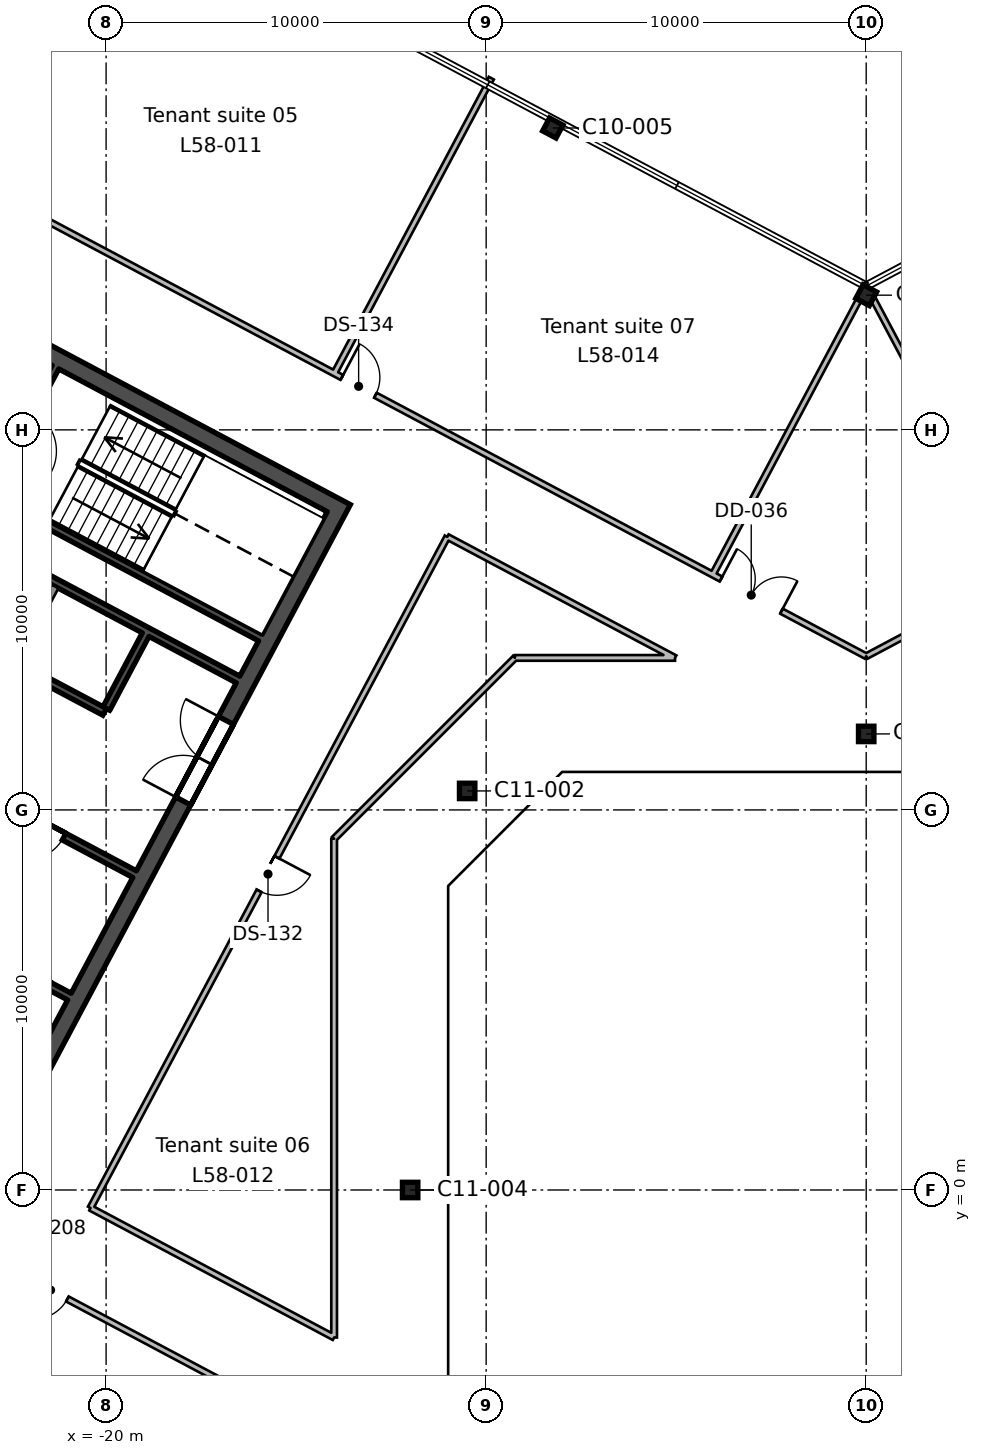
"""IFC4 building model, lengths in metres.
Left out: names, types, materials, properties, quantities, classifications, styles, units other than length and angle.
Written with IfcOpenShell. Run it as: python <this file> out.ifc"""

import sys

from ifc_helpers import new_model, si_unit, direction, frame, frame_2d, origin, origin_2d, place, context, subcontext, project, spatial, rectangle, hollow_rectangle, i_section, extrude, element, fill, save


model = new_model("IFC4")
c1 = context("Model", 3, precision=1e-05, world=origin(), true_north=direction((0.0, 1.0)))
c2 = subcontext(c1, "Body", "Model", "MODEL_VIEW")
j1 = project(units=[si_unit("LENGTHUNIT", "METRE"), si_unit("PLANEANGLEUNIT", "RADIAN")], contexts=[c1])
p1 = place(None, origin())
s1 = spatial("IfcSite", under=j1, at=p1, CompositionType="ELEMENT")
p2 = place(p1, origin())
s2 = spatial("IfcBuilding", under=s1, at=p2, CompositionType="ELEMENT")
p3 = place(p2, frame((0.0, 0.0, 261.9)))
s3 = spatial("IfcBuildingStorey", under=s2, at=p3, CompositionType="ELEMENT", Elevation=261.9)
for number, where, z_axis, x_axis in (
    (1, (-12.0, 0.0, 0.0), (0.0, 0.0, 1.0), (1.0, 0.0, 0.0)),
    (2, (-10.5, 10.5, 0.0), (0.0, 0.0, 1.0), (1.0, 0.0, 0.0)),
    (3, (0.0, 12.0, 0.0), (0.0, 0.0, 1.0), (1.0, 0.0, 0.0)),
):
    element("IfcColumn", number, at=place(p3, frame(where, z_axis=z_axis, x_axis=x_axis)), inside=s3, PredefinedType="COLUMN", context=c2, shape_type="SweptSolid", body=[
        extrude(hollow_rectangle(XDim=0.406, YDim=0.406, WallThickness=0.009, InnerFilletRadius=0.004, OuterFilletRadius=0.013, at=origin_2d()), origin(), (0.0, 0.0, 1.0), 3.9),
    ])
p4 = place(p3, frame((0.0, 23.544, 0.0), z_axis=(0.0, 0.0, 1.0), x_axis=(-0.882947592859, 0.469471562786, 0.0)))
e4 = element("IfcColumn", 4, at=p4, inside=s3, PredefinedType="COLUMN", context=c2, shape_type="SweptSolid", body=[
    extrude(i_section(OverallWidth=0.404, OverallDepth=0.406, WebThickness=0.027, FlangeThickness=0.044, FilletRadius=0.015, at=origin_2d()), origin(), (0.0, 0.0, 1.0), 3.9),
])
p5 = place(p3, frame((-8.247, 27.943, 0.0), z_axis=(0.0, 0.0, 1.0), x_axis=(-0.882947592859, 0.469471562786, 0.0)))
e5 = element("IfcColumn", 5, at=p5, inside=s3, PredefinedType="COLUMN", context=c2, shape_type="SweptSolid", body=[
    extrude(i_section(OverallWidth=0.399, OverallDepth=0.386, WebThickness=0.021, FlangeThickness=0.033, FilletRadius=0.015, at=origin_2d()), origin(), (0.0, 0.0, 1.0), 3.9),
])
p6 = place(p3, frame((-13.771, 18.138, 0.0), z_axis=(0.0, 0.0, 1.0), x_axis=(-0.469467968382, -0.882949504028, 0.0)))
e6 = element("IfcWall", 6, at=p6, inside=s3, PredefinedType="SHEAR", context=c2, shape_type="SweptSolid", body=[
    extrude(rectangle(XDim=19.1, YDim=0.45, at=frame_2d((9.55, 0.0))), origin(), (0.0, 0.0, 1.0), 3.9),
])
p7 = place(p6, frame((6.55, 0.0, 0.0)))
e7 = element("IfcOpeningElement", 7, at=p7, cuts=e6, PredefinedType="OPENING", context=c2, shape_type="SweptSolid", body=[
    extrude(rectangle(XDim=2.4, YDim=2.4, at=frame_2d((1.2, 1.2))), frame((0.0, 0.235, 0.0), z_axis=(0.0, -1.0, 0.0), x_axis=(1.0, 0.0, 0.0)), (0.0, 0.0, 1.0), 0.47),
])
p8 = place(p3, frame((-14.076, 18.045, 0.0), z_axis=(0.0, 0.0, 1.0), x_axis=(-0.882947755831, 0.46947125628, 0.0)))
e8 = element("IfcWall", 8, at=p8, inside=s3, PredefinedType="SHEAR", context=c2, shape_type="SweptSolid", body=[
    extrude(rectangle(XDim=20.2, YDim=0.45, at=frame_2d((10.1, 0.0))), origin(), (0.0, 0.0, 1.0), 3.9),
])
p9 = place(p3, frame((-18.96, 14.611, 0.0), z_axis=(0.0, 0.0, 1.0), x_axis=(-0.4694473164, -0.882960484464, 0.0)))
e9 = element("IfcWall", 9, at=p9, inside=s3, PredefinedType="SHEAR", context=c2, shape_type="SweptSolid", body=[
    extrude(rectangle(XDim=2.2, YDim=0.2, at=frame_2d((1.1, 0.0))), origin(), (0.0, 0.0, 1.0), 3.9),
])
p10 = place(p3, frame((-21.344, 15.879, 0.0), z_axis=(0.0, 0.0, 1.0), x_axis=(-0.4694473164, -0.882960484464, 0.0)))
e10 = element("IfcWall", 10, at=p10, inside=s3, PredefinedType="SOLIDWALL", context=c2, shape_type="SweptSolid", body=[
    extrude(rectangle(XDim=2.2, YDim=0.2, at=frame_2d((1.1, 0.0))), origin(), (0.0, 0.0, 1.0), 3.9),
])
p11 = place(p3, frame((-21.333, 21.649, 0.0), z_axis=(0.0, 0.0, 1.0), x_axis=(-0.469494272526, -0.882935517501, 0.0)))
e11 = element("IfcWall", 11, at=p11, inside=s3, PredefinedType="SHEAR", context=c2, shape_type="SweptSolid", body=[
    extrude(rectangle(XDim=7.3, YDim=0.2, at=frame_2d((3.65, 0.0))), origin(), (0.0, 0.0, 1.0), 3.9),
])
p12 = place(p11, frame((1.3, 0.0, 0.0)))
e12 = element("IfcOpeningElement", 12, at=p12, cuts=e11, PredefinedType="OPENING", context=c2, shape_type="SweptSolid", body=[
    extrude(rectangle(XDim=1.2, YDim=2.1, at=frame_2d((0.6, 1.05))), frame((0.0, 0.11, 0.0), z_axis=(0.0, -1.0, 0.0), x_axis=(1.0, 0.0, 0.0)), (0.0, 0.0, 1.0), 0.22),
])
p13 = place(p3, frame((-15.942, 14.536, 0.0), z_axis=(0.0, 0.0, 1.0), x_axis=(-0.882946947542, 0.469472776449, 0.0)))
e13 = element("IfcWall", 13, at=p13, inside=s3, PredefinedType="SHEAR", context=c2, shape_type="SweptSolid", body=[
    extrude(rectangle(XDim=8.0, YDim=0.2, at=frame_2d((4.0, 0.0))), origin(), (0.0, 0.0, 1.0), 3.9),
])
p14 = place(p3, frame((-16.529, 13.432, 0.0), z_axis=(0.0, 0.0, 1.0), x_axis=(-0.88295287151, 0.469461634952, 0.0)))
e14 = element("IfcWall", 14, at=p14, inside=s3, PredefinedType="SHEAR", context=c2, shape_type="SweptSolid", body=[
    extrude(rectangle(XDim=8.0, YDim=0.2, at=frame_2d((4.0, 0.0))), origin(), (0.0, 0.0, 1.0), 3.9),
])
p15 = place(p3, frame((-20.04, 12.581, 0.0), z_axis=(0.0, 0.0, 1.0), x_axis=(-0.882942972946, 0.469480251476, 0.0)))
e15 = element("IfcWall", 15, at=p15, inside=s3, PredefinedType="SHEAR", context=c2, shape_type="SweptSolid", body=[
    extrude(rectangle(XDim=5.4, YDim=0.2, at=frame_2d((2.7, 0.0))), origin(), (0.0, 0.0, 1.0), 3.9),
])
p16 = place(p3, frame((-19.252, 8.311, 0.0), z_axis=(0.0, 0.0, 1.0), x_axis=(-0.882955722218, 0.469456273365, 0.0)))
e16 = element("IfcWall", 16, at=p16, inside=s3, PredefinedType="SHEAR", context=c2, shape_type="SweptSolid", body=[
    extrude(rectangle(XDim=10.0, YDim=0.2, at=frame_2d((5.0, 0.0))), origin(), (0.0, 0.0, 1.0), 3.9),
])
p17 = place(p16, frame((2.1, 0.0, 0.0)))
e17 = element("IfcOpeningElement", 17, at=p17, cuts=e16, PredefinedType="OPENING", context=c2, shape_type="SweptSolid", body=[
    extrude(rectangle(XDim=1.2, YDim=2.1, at=frame_2d((0.6, 1.05))), frame((0.0, 0.11, 0.0), z_axis=(0.0, -1.0, 0.0), x_axis=(1.0, 0.0, 0.0)), (0.0, 0.0, 1.0), 0.22),
])
p18 = place(p16, frame((5.4, 0.0, 0.0)))
e18 = element("IfcOpeningElement", 18, at=p18, cuts=e16, PredefinedType="OPENING", context=c2, shape_type="SweptSolid", body=[
    extrude(rectangle(XDim=1.1, YDim=2.1, at=frame_2d((0.55, 1.05))), frame((0.0, 0.11, 0.0), z_axis=(0.0, -1.0, 0.0), x_axis=(1.0, 0.0, 0.0)), (0.0, 0.0, 1.0), 0.22),
])
p19 = place(p16, frame((8.1, 0.0, 0.0)))
e19 = element("IfcOpeningElement", 19, at=p19, cuts=e16, PredefinedType="OPENING", context=c2, shape_type="SweptSolid", body=[
    extrude(rectangle(XDim=1.1, YDim=2.1, at=frame_2d((0.55, 1.05))), frame((0.0, 0.11, 0.0), z_axis=(0.0, -1.0, 0.0), x_axis=(1.0, 0.0, 0.0)), (0.0, 0.0, 1.0), 0.22),
])
p20 = place(p3, frame((-20.965, 5.088, 0.0), z_axis=(0.0, 0.0, 1.0), x_axis=(-0.882925986334, 0.469512196493, 0.0)))
e20 = element("IfcWall", 20, at=p20, inside=s3, PredefinedType="SHEAR", context=c2, shape_type="SweptSolid", body=[
    extrude(rectangle(XDim=4.5, YDim=0.2, at=frame_2d((2.25, 0.0))), origin(), (0.0, 0.0, 1.0), 3.9),
])
p21 = place(p20, frame((0.6, 0.0, 0.0)))
e21 = element("IfcOpeningElement", 21, at=p21, cuts=e20, PredefinedType="OPENING", context=c2, shape_type="SweptSolid", body=[
    extrude(rectangle(XDim=1.1, YDim=2.1, at=frame_2d((0.55, 1.05))), frame((0.0, 0.11, 0.0), z_axis=(0.0, -1.0, 0.0), x_axis=(1.0, 0.0, 0.0)), (0.0, 0.0, 1.0), 0.22),
])
p22 = place(p3, frame((-48.541, 39.854, 0.0), z_axis=(0.0, 0.0, 1.0), x_axis=(0.882945008423, -0.469476423372, 0.0)))
e22 = element("IfcWall", 22, at=p22, inside=s3, PredefinedType="PARTITIONING", context=c2, shape_type="SweptSolid", body=[
    extrude(rectangle(XDim=54.976, YDim=0.15, at=frame_2d((27.488, 0.0))), origin(), (0.0, 0.0, 1.0), 3.54),
])
p23 = place(p22, frame((50.65, 0.0, 0.0)))
e23 = element("IfcOpeningElement", 23, at=p23, cuts=e22, PredefinedType="OPENING", context=c2, shape_type="SweptSolid", body=[
    extrude(rectangle(XDim=1.8, YDim=2.1, at=frame_2d((0.9, 1.05))), frame((0.0, 0.085, 0.0), z_axis=(0.0, -1.0, 0.0), x_axis=(1.0, 0.0, 0.0)), (0.0, 0.0, 1.0), 0.17),
])
p24 = place(p22, frame((39.35, 0.0, 0.0)))
e24 = element("IfcOpeningElement", 24, at=p24, cuts=e22, PredefinedType="OPENING", context=c2, shape_type="SweptSolid", body=[
    extrude(rectangle(XDim=1.0, YDim=2.1, at=frame_2d((0.5, 1.05))), frame((0.0, 0.085, 0.0), z_axis=(0.0, -1.0, 0.0), x_axis=(1.0, 0.0, 0.0)), (0.0, 0.0, 1.0), 0.17),
])
p25 = place(p22, frame((26.95, 0.0, 0.0)))
e25 = element("IfcOpeningElement", 25, at=p25, cuts=e22, PredefinedType="OPENING", context=c2, shape_type="SweptSolid", body=[
    extrude(rectangle(XDim=1.0, YDim=2.1, at=frame_2d((0.5, 1.05))), frame((0.0, 0.085, 0.0), z_axis=(0.0, -1.0, 0.0), x_axis=(1.0, 0.0, 0.0)), (0.0, 0.0, 1.0), 0.17),
])
p26 = place(p22, frame((21.049, 0.0, 0.0)))
e26 = element("IfcOpeningElement", 26, at=p26, cuts=e22, PredefinedType="OPENING", context=c2, shape_type="SweptSolid", body=[
    extrude(rectangle(XDim=1.0, YDim=2.1, at=frame_2d((0.5, 1.05))), frame((0.0, 0.085, 0.0), z_axis=(0.0, -1.0, 0.0), x_axis=(1.0, 0.0, 0.0)), (0.0, 0.0, 1.0), 0.17),
])
p27 = place(p22, frame((15.35, 0.0, 0.0)))
e27 = element("IfcOpeningElement", 27, at=p27, cuts=e22, PredefinedType="OPENING", context=c2, shape_type="SweptSolid", body=[
    extrude(rectangle(XDim=1.0, YDim=2.1, at=frame_2d((0.5, 1.05))), frame((0.0, 0.085, 0.0), z_axis=(0.0, -1.0, 0.0), x_axis=(1.0, 0.0, 0.0)), (0.0, 0.0, 1.0), 0.17),
])
p28 = place(p3, frame((0.0, 14.044, 0.0), z_axis=(0.0, 0.0, 1.0), x_axis=(0.882952097871, 0.469463089992, 0.0)))
e28 = element("IfcWall", 28, at=p28, inside=s3, PredefinedType="PARTITIONING", context=c2, shape_type="SweptSolid", body=[
    extrude(rectangle(XDim=33.607, YDim=0.15, at=frame_2d((16.803, 0.0))), origin(), (0.0, 0.0, 1.0), 3.54),
])
p29 = place(p3, frame((-14.0, -6.6, 0.0), z_axis=(0.0, 0.0, 1.0), x_axis=(-0.88294319167, 0.469479840125, 0.0)))
e29 = element("IfcWall", 29, at=p29, inside=s3, PredefinedType="PARTITIONING", context=c2, shape_type="SweptSolid", body=[
    extrude(rectangle(XDim=36.344, YDim=0.15, at=frame_2d((18.172, 0.0))), origin(), (0.0, 0.0, 1.0), 3.54),
])
p30 = place(p29, frame((25.35, 0.0, 0.0)))
e30 = element("IfcOpeningElement", 30, at=p30, cuts=e29, PredefinedType="OPENING", context=c2, shape_type="SweptSolid", body=[
    extrude(rectangle(XDim=1.0, YDim=2.1, at=frame_2d((0.5, 1.05))), frame((0.0, 0.085, 0.0), z_axis=(0.0, -1.0, 0.0), x_axis=(1.0, 0.0, 0.0)), (0.0, 0.0, 1.0), 0.17),
])
p31 = place(p29, frame((17.65, 0.0, 0.0)))
e31 = element("IfcOpeningElement", 31, at=p31, cuts=e29, PredefinedType="OPENING", context=c2, shape_type="SweptSolid", body=[
    extrude(rectangle(XDim=1.0, YDim=2.1, at=frame_2d((0.5, 1.05))), frame((0.0, 0.085, 0.0), z_axis=(0.0, -1.0, 0.0), x_axis=(1.0, 0.0, 0.0)), (0.0, 0.0, 1.0), 0.17),
])
p32 = place(p29, frame((7.95, 0.0, 0.0)))
e32 = element("IfcOpeningElement", 32, at=p32, cuts=e29, PredefinedType="OPENING", context=c2, shape_type="SweptSolid", body=[
    extrude(rectangle(XDim=1.0, YDim=2.1, at=frame_2d((0.5, 1.05))), frame((0.0, 0.085, 0.0), z_axis=(0.0, -1.0, 0.0), x_axis=(1.0, 0.0, 0.0)), (0.0, 0.0, 1.0), 0.17),
])
p33 = place(p3, frame((-9.864, 29.255, 0.0), z_axis=(0.0, 0.0, 1.0), x_axis=(-0.469457446168, -0.882955098653, 0.0)))
e33 = element("IfcWall", 33, at=p33, inside=s3, PredefinedType="PARTITIONING", context=c2, shape_type="SweptSolid", body=[
    extrude(rectangle(XDim=8.8, YDim=0.15, at=frame_2d((4.4, 0.0))), origin(), (0.0, 0.0, 1.0), 3.54),
])
p34 = place(p3, frame((-0.195, 23.418, 0.0), z_axis=(0.0, 0.0, 1.0), x_axis=(-0.469409645302, -0.882980512184, 0.0)))
e34 = element("IfcWall", 34, at=p34, inside=s3, PredefinedType="PARTITIONING", context=c2, shape_type="SweptSolid", body=[
    extrude(rectangle(XDim=8.185, YDim=0.15, at=frame_2d((4.092, 0.0))), origin(), (0.0, 0.0, 1.0), 3.54),
])
p35 = place(p3, frame((0.179, 23.45, 0.0), z_axis=(0.0, 0.0, 1.0), x_axis=(0.469359563697, -0.88300713472, 0.0)))
e35 = element("IfcWall", 35, at=p35, inside=s3, PredefinedType="PARTITIONING", context=c2, shape_type="SweptSolid", body=[
    extrude(rectangle(XDim=2.621, YDim=0.15, at=frame_2d((1.31, 0.0))), origin(), (0.0, 0.0, 1.0), 3.54),
])
p36 = place(p3, frame((-20.411, -0.473, 0.0), z_axis=(0.0, 0.0, 1.0), x_axis=(0.469451816494, 0.882958091865, 0.0)))
e36 = element("IfcWall", 36, at=p36, inside=s3, PredefinedType="PARTITIONING", context=c2, shape_type="SweptSolid", body=[
    extrude(rectangle(XDim=20.0, YDim=0.15, at=frame_2d((10.0, 0.0))), origin(), (0.0, 0.0, 1.0), 3.54),
])
p37 = place(p36, frame((9.45, 0.0, 0.0)))
e37 = element("IfcOpeningElement", 37, at=p37, cuts=e36, PredefinedType="OPENING", context=c2, shape_type="SweptSolid", body=[
    extrude(rectangle(XDim=1.0, YDim=2.1, at=frame_2d((0.5, 1.05))), frame((0.0, 0.085, 0.0), z_axis=(0.0, -1.0, 0.0), x_axis=(1.0, 0.0, 0.0)), (0.0, 0.0, 1.0), 0.17),
])
p38 = place(p3, frame((-11.022, 17.186, 0.0), z_axis=(0.0, 0.0, 1.0), x_axis=(0.882943783905, -0.469478726316, 0.0)))
e38 = element("IfcWall", 38, at=p38, inside=s3, PredefinedType="PARTITIONING", context=c2, shape_type="SweptSolid", body=[
    extrude(rectangle(XDim=6.786, YDim=0.15, at=frame_2d((3.393, 0.0))), origin(), (0.0, 0.0, 1.0), 3.54),
])
p39 = place(p3, frame((-5.03, 14.0, 0.0), z_axis=(0.0, 0.0, 1.0), x_axis=(-1.0, 0.0, 0.0)))
e39 = element("IfcWall", 39, at=p39, inside=s3, PredefinedType="PARTITIONING", context=c2, shape_type="SweptSolid", body=[
    extrude(rectangle(XDim=4.213, YDim=0.15, at=frame_2d((2.106, 0.0))), origin(), (0.0, 0.0, 1.0), 3.54),
])
p40 = place(p3, frame((-9.243, 14.0, 0.0), z_axis=(0.0, 0.0, 1.0), x_axis=(-0.707106781187, -0.707106781187, 0.0)))
e40 = element("IfcWall", 40, at=p40, inside=s3, PredefinedType="PARTITIONING", context=c2, shape_type="SweptSolid", body=[
    extrude(rectangle(XDim=6.728, YDim=0.15, at=frame_2d((3.364, 0.0))), origin(), (0.0, 0.0, 1.0), 3.54),
])
p41 = place(p3, frame((-14.0, 9.243, 0.0), z_axis=(0.0, 0.0, 1.0), x_axis=(0.0, -1.0, 0.0)))
e41 = element("IfcWall", 41, at=p41, inside=s3, PredefinedType="PARTITIONING", context=c2, shape_type="SweptSolid", body=[
    extrude(rectangle(XDim=13.125, YDim=0.15, at=frame_2d((6.562, 0.0))), origin(), (0.0, 0.0, 1.0), 3.54),
])
p42 = place(p3, frame((-14.0, -3.882, 0.0), z_axis=(0.0, 0.0, 1.0), x_axis=(-0.882921917986, 0.469519847014, 0.0)))
e42 = element("IfcWall", 42, at=p42, inside=s3, PredefinedType="PARTITIONING", context=c2, shape_type="SweptSolid", body=[
    extrude(rectangle(XDim=7.261, YDim=0.15, at=frame_2d((3.63, 0.0))), origin(), (0.0, 0.0, 1.0), 3.54),
])
p43 = place(p7, frame((2.4, 0.0, 0.0), z_axis=(0.0, 0.0, 1.0), x_axis=(-1.0, 0.0, 0.0)))
e43 = element("IfcDoor", 43, at=p43, inside=s3, OperationType="DOUBLE_DOOR_SINGLE_SWING", PredefinedType="DOOR", context=c2, shape_type="SweptSolid", body=[
    extrude(rectangle(XDim=2.4, YDim=2.4, at=frame_2d((1.2, 1.2))), frame((0.0, 0.025, 0.0), z_axis=(0.0, -1.0, 0.0), x_axis=(1.0, 0.0, 0.0)), (0.0, 0.0, 1.0), 0.05),
])
fill(e7, e43)
p44 = place(p17, origin())
e44 = element("IfcDoor", 44, at=p44, inside=s3, OperationType="SINGLE_SWING_RIGHT", PredefinedType="DOOR", context=c2, shape_type="SweptSolid", body=[
    extrude(rectangle(XDim=1.2, YDim=2.1, at=frame_2d((0.6, 1.05))), frame((0.0, 0.025, 0.0), z_axis=(0.0, -1.0, 0.0), x_axis=(1.0, 0.0, 0.0)), (0.0, 0.0, 1.0), 0.05),
])
fill(e17, e44)
p45 = place(p37, frame((1.0, 0.0, 0.0), z_axis=(0.0, 0.0, 1.0), x_axis=(-1.0, 0.0, 0.0)))
e45 = element("IfcDoor", 45, at=p45, inside=s3, OperationType="SINGLE_SWING_LEFT", PredefinedType="DOOR", context=c2, shape_type="SweptSolid", body=[
    extrude(rectangle(XDim=1.0, YDim=2.1, at=frame_2d((0.5, 1.05))), frame((0.0, 0.025, 0.0), z_axis=(0.0, -1.0, 0.0), x_axis=(1.0, 0.0, 0.0)), (0.0, 0.0, 1.0), 0.05),
])
fill(e37, e45)
p46 = place(p32, origin())
e46 = element("IfcDoor", 46, at=p46, inside=s3, OperationType="SINGLE_SWING_RIGHT", PredefinedType="DOOR", context=c2, shape_type="SweptSolid", body=[
    extrude(rectangle(XDim=1.0, YDim=2.1, at=frame_2d((0.5, 1.05))), frame((0.0, 0.025, 0.0), z_axis=(0.0, -1.0, 0.0), x_axis=(1.0, 0.0, 0.0)), (0.0, 0.0, 1.0), 0.05),
])
fill(e32, e46)
p47 = place(p23, origin())
e47 = element("IfcDoor", 47, at=p47, inside=s3, OperationType="DOUBLE_DOOR_SINGLE_SWING", PredefinedType="DOOR", context=c2, shape_type="SweptSolid", body=[
    extrude(rectangle(XDim=1.8, YDim=2.1, at=frame_2d((0.9, 1.05))), frame((0.0, 0.025, 0.0), z_axis=(0.0, -1.0, 0.0), x_axis=(1.0, 0.0, 0.0)), (0.0, 0.0, 1.0), 0.05),
])
fill(e23, e47)
p48 = place(p24, origin())
e48 = element("IfcDoor", 48, at=p48, inside=s3, OperationType="SINGLE_SWING_LEFT", PredefinedType="DOOR", context=c2, shape_type="SweptSolid", body=[
    extrude(rectangle(XDim=1.0, YDim=2.1, at=frame_2d((0.5, 1.05))), frame((0.0, 0.025, 0.0), z_axis=(0.0, -1.0, 0.0), x_axis=(1.0, 0.0, 0.0)), (0.0, 0.0, 1.0), 0.05),
])
fill(e24, e48)
save(model, sys.argv[1])
